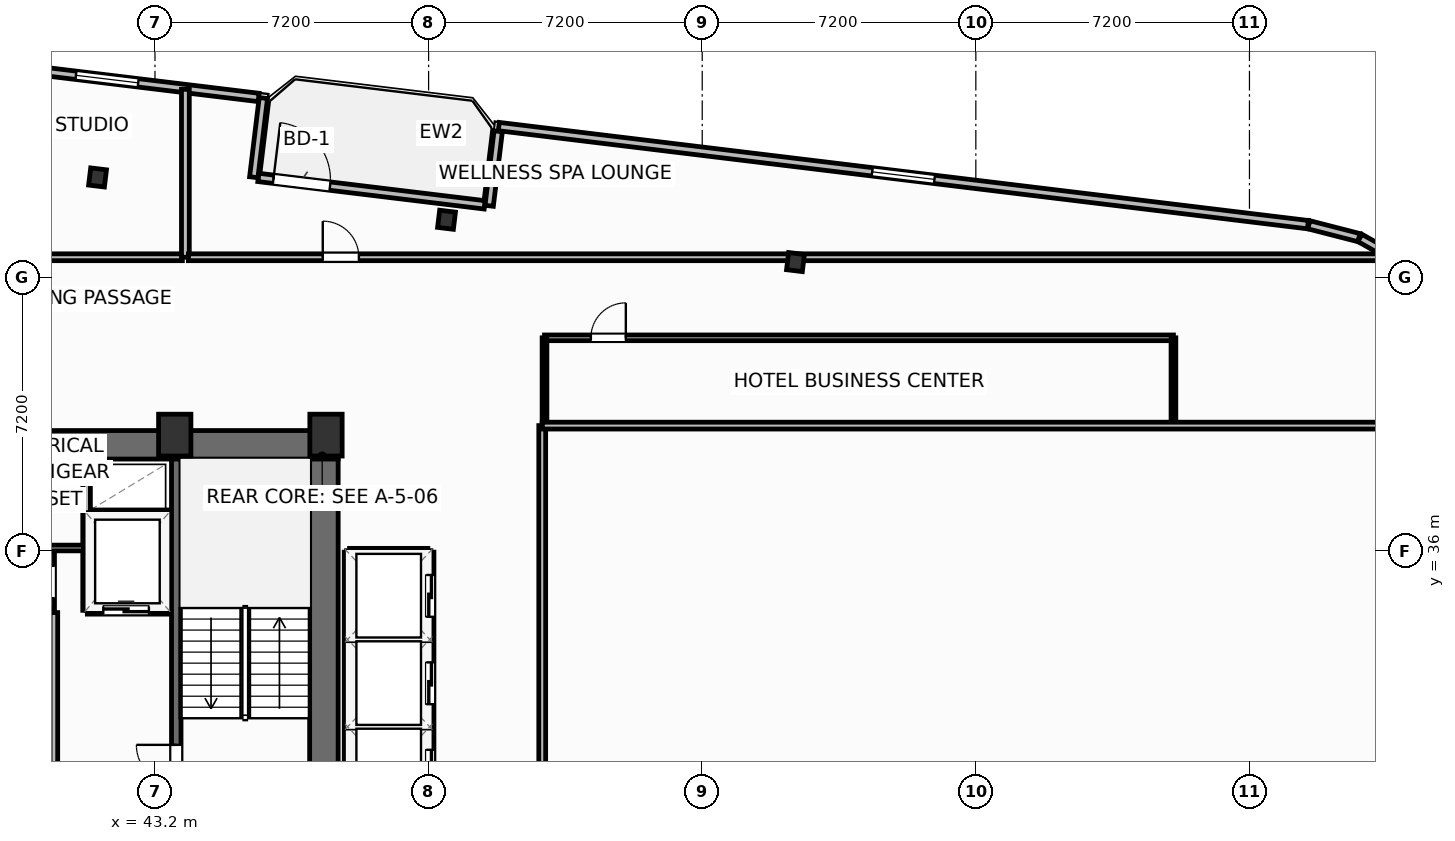
"""IFC4 building model, lengths in metres.
Left out: names, types, materials, properties, quantities, classifications, styles, units other than length and angle.
Written with IfcOpenShell. Run it as: python <this file> out.ifc"""

import sys

from ifc_helpers import new_model, si_unit, direction, frame, frame_2d, origin, origin_2d, place, context, subcontext, project, spatial, rectangle, i_section, extrude, element, fill, save


model = new_model("IFC4")
c1 = context("Model", 3, precision=1e-05, world=origin(), true_north=direction((0.0, 1.0)))
c2 = subcontext(c1, "Body", "Model", "MODEL_VIEW")
j1 = project(units=[si_unit("LENGTHUNIT", "METRE"), si_unit("PLANEANGLEUNIT", "RADIAN")], contexts=[c1])
p1 = place(None, origin())
s1 = spatial("IfcSite", under=j1, at=p1, CompositionType="ELEMENT")
p2 = place(p1, origin())
s2 = spatial("IfcBuilding", under=s1, at=p2, CompositionType="ELEMENT")
p3 = place(p2, frame((0.0, 0.0, 155.0)))
s3 = spatial("IfcBuildingStorey", under=s2, at=p3, CompositionType="ELEMENT", Elevation=155.0)
for number, where, z_axis, x_axis in (
    (1, (43.72, 39.05, 0.0), (0.0, 0.0, 1.0), (1.0, 0.0, 0.0)),
    (2, (47.7, 39.05, 0.0), (0.0, 0.0, 1.0), (1.0, 0.0, 0.0)),
):
    element("IfcColumn", number, at=place(p3, frame(where, z_axis=z_axis, x_axis=x_axis)), inside=s3, PredefinedType="COLUMN", context=c2, shape_type="SweptSolid", body=[
        extrude(rectangle(XDim=0.85, YDim=1.1, at=origin_2d()), origin(), (0.0, 0.0, 1.0), 3.7),
    ])
p4 = place(p3, frame((30.38, 38.795, 0.0), z_axis=(0.0, 0.0, 1.0), x_axis=(1.0, 0.0, 0.0)))
e3 = element("IfcWall", 3, at=p4, inside=s3, PredefinedType="SHEAR", context=c2, shape_type="SweptSolid", body=[
    extrude(rectangle(XDim=17.64, YDim=0.75, at=frame_2d((8.82, 0.0))), origin(), (0.0, 0.0, 1.0), 3.45),
])
p5 = place(p3, frame((47.645, 29.2, 0.0), z_axis=(0.0, 0.0, 1.0), x_axis=(0.0, 1.0, 0.0)))
e4 = element("IfcWall", 4, at=p5, inside=s3, PredefinedType="SHEAR", context=c2, shape_type="SweptSolid", body=[
    extrude(rectangle(XDim=9.22, YDim=0.75, at=frame_2d((4.61, 0.0))), origin(), (0.0, 0.0, 1.0), 3.45),
])
p6 = place(p3, frame((43.76, 29.2, 0.0), z_axis=(0.0, 0.0, 1.0), x_axis=(0.0, 1.0, 0.0)))
e5 = element("IfcWall", 5, at=p6, inside=s3, PredefinedType="SHEAR", context=c2, shape_type="SweptSolid", body=[
    extrude(rectangle(XDim=9.22, YDim=0.25, at=frame_2d((4.61, 0.0))), origin(), (0.0, 0.0, 1.0), 3.45),
])
p7 = place(p6, frame((0.65, 0.0, 0.0)))
e6 = element("IfcOpeningElement", 6, at=p7, cuts=e5, PredefinedType="OPENING", context=c2, shape_type="SweptSolid", body=[
    extrude(rectangle(XDim=1.05, YDim=2.15, at=frame_2d((0.525, 1.075))), frame((0.0, 0.135, 0.0), z_axis=(0.0, -1.0, 0.0), x_axis=(1.0, 0.0, 0.0)), (0.0, 0.0, 1.0), 0.27),
])
for number, where, z_axis, x_axis in (
    (7, (60.054, 43.603, 0.0), (0.0, 0.0, 1.0), (0.993, -0.12, 0.0)),
    (8, (50.872, 44.717, 0.0), (0.0, 0.0, 1.0), (0.993, -0.12, 0.0)),
    (9, (41.689, 45.83, 0.0), (0.0, 0.0, 1.0), (0.993, -0.12, 0.0)),
):
    element("IfcColumn", number, at=place(p3, frame(where, z_axis=z_axis, x_axis=x_axis)), inside=s3, PredefinedType="COLUMN", context=c2, shape_type="SweptSolid", body=[
        extrude(i_section(OverallWidth=0.418, OverallDepth=0.455, WebThickness=0.042, FlangeThickness=0.068, FilletRadius=0.025, at=origin_2d()), origin(), (0.0, 0.0, 1.0), 3.7),
    ])
p8 = place(p3, frame((45.92, 45.831, 0.0), z_axis=(0.0, 0.0, 1.0), x_axis=(0.992729951822, -0.120362962556, 0.0)))
e10 = element("IfcWall", 10, at=p8, inside=s3, PredefinedType="SOLIDWALL", context=c2, shape_type="SweptSolid", body=[
    extrude(rectangle(XDim=6.0, YDim=0.22, at=frame_2d((3.0, 0.0))), origin(), (0.0, 0.0, 1.0), 2.73),
])
p9 = place(p8, frame((0.4, 0.0, 0.0)))
e11 = element("IfcOpeningElement", 11, at=p9, cuts=e10, PredefinedType="OPENING", context=c2, shape_type="SweptSolid", body=[
    extrude(rectangle(XDim=1.5, YDim=2.25, at=frame_2d((0.75, 1.125))), frame((0.0, 0.12, 0.0), z_axis=(0.0, -1.0, 0.0), x_axis=(1.0, 0.0, 0.0)), (0.0, 0.0, 1.0), 0.24),
])
p10 = place(p3, frame((76.084, 43.575, 0.0), z_axis=(0.0, 0.0, 1.0), x_axis=(-0.871093268227, 0.491117621399, 0.0)))
e12 = element("IfcWall", 12, at=p10, inside=s3, PredefinedType="SOLIDWALL", context=c2, shape_type="SweptSolid", body=[
    extrude(rectangle(XDim=1.353, YDim=0.22, at=frame_2d((0.677, 0.0))), origin(), (0.0, 0.0, 1.0), 2.73),
])
p11 = place(p3, frame((74.881, 44.246, 0.0), z_axis=(0.0, 0.0, 1.0), x_axis=(-0.968549775063, 0.248819881091, 0.0)))
e13 = element("IfcWall", 13, at=p11, inside=s3, PredefinedType="SOLIDWALL", context=c2, shape_type="SweptSolid", body=[
    extrude(rectangle(XDim=1.361, YDim=0.22, at=frame_2d((0.68, 0.0))), origin(), (0.0, 0.0, 1.0), 2.73),
])
p12 = place(p3, frame((73.538, 44.588, 0.0), z_axis=(0.0, 0.0, 1.0), x_axis=(-0.992733493583, 0.120333747213, 0.0)))
e14 = element("IfcWall", 14, at=p12, inside=s3, PredefinedType="SOLIDWALL", context=c2, shape_type="SweptSolid", body=[
    extrude(rectangle(XDim=21.447, YDim=0.22, at=frame_2d((10.724, 0.0))), origin(), (0.0, 0.0, 1.0), 2.73),
])
p13 = place(p12, frame((9.899, 0.0, 0.8)))
e15 = element("IfcOpeningElement", 15, at=p13, cuts=e14, PredefinedType="OPENING", context=c2, shape_type="SweptSolid", body=[
    extrude(rectangle(XDim=1.65, YDim=1.65, at=frame_2d((0.825, 0.825))), frame((0.0, 0.12, 0.0), z_axis=(0.0, -1.0, 0.0), x_axis=(1.0, 0.0, 0.0)), (0.0, 0.0, 1.0), 0.24),
])
p14 = place(p3, frame((52.231, 47.045, 0.0), z_axis=(0.0, 0.0, 1.0), x_axis=(-0.120275992932, -0.992740492538, 0.0)))
e16 = element("IfcWall", 16, at=p14, inside=s3, PredefinedType="SOLIDWALL", context=c2, shape_type="SweptSolid", body=[
    extrude(rectangle(XDim=1.975, YDim=0.22, at=frame_2d((0.988, 0.0))), origin(), (0.0, 0.0, 1.0), 2.73),
])
p15 = place(p3, frame((45.799, 45.835, 0.0), z_axis=(0.0, 0.0, 1.0), x_axis=(0.120314009587, 0.992735885871, 0.0)))
e17 = element("IfcWall", 17, at=p15, inside=s3, PredefinedType="SOLIDWALL", context=c2, shape_type="SweptSolid", body=[
    extrude(rectangle(XDim=2.1, YDim=0.22, at=frame_2d((1.05, 0.0))), origin(), (0.0, 0.0, 1.0), 2.73),
])
p16 = place(p3, frame((45.928, 47.935, 0.0), z_axis=(0.0, 0.0, 1.0), x_axis=(-0.992730591876, 0.120357683402, 0.0)))
e18 = element("IfcWall", 18, at=p16, inside=s3, PredefinedType="SOLIDWALL", context=c2, shape_type="SweptSolid", body=[
    extrude(rectangle(XDim=8.035, YDim=0.22, at=frame_2d((4.017, 0.0))), origin(), (0.0, 0.0, 1.0), 2.73),
])
p17 = place(p16, frame((3.192, 0.0, 0.8)))
e19 = element("IfcOpeningElement", 19, at=p17, cuts=e18, PredefinedType="OPENING", context=c2, shape_type="SweptSolid", body=[
    extrude(rectangle(XDim=1.65, YDim=1.65, at=frame_2d((0.825, 0.825))), frame((0.0, 0.12, 0.0), z_axis=(0.0, -1.0, 0.0), x_axis=(1.0, 0.0, 0.0)), (0.0, 0.0, 1.0), 0.24),
])
p18 = place(p3, frame((53.45, 41.61, 0.0), z_axis=(0.0, 0.0, 1.0), x_axis=(1.0, 0.0, 0.0)))
e20 = element("IfcWall", 20, at=p18, inside=s3, PredefinedType="PARTITIONING", context=c2, shape_type="SweptSolid", body=[
    extrude(rectangle(XDim=16.55, YDim=0.15, at=frame_2d((8.275, 0.0))), origin(), (0.0, 0.0, 1.0), 2.972),
])
p19 = place(p18, frame((1.22, 0.0, 0.0)))
e21 = element("IfcOpeningElement", 21, at=p19, cuts=e20, PredefinedType="OPENING", context=c2, shape_type="SweptSolid", body=[
    extrude(rectangle(XDim=0.92, YDim=2.05, at=frame_2d((0.46, 1.025))), frame((0.0, 0.085, 0.0), z_axis=(0.0, -1.0, 0.0), x_axis=(1.0, 0.0, 0.0)), (0.0, 0.0, 1.0), 0.17),
])
for number, where, z_axis, x_axis in (
    (22, (53.45, 39.3, 0.0), (0.0, 0.0, 1.0), (0.0, 1.0, 0.0)),
    (23, (70.0, 39.3, 0.0), (0.0, 0.0, 1.0), (0.0, 1.0, 0.0)),
):
    element("IfcWall", number, at=place(p3, frame(where, z_axis=z_axis, x_axis=x_axis)), inside=s3, PredefinedType="PARTITIONING", context=c2, shape_type="SweptSolid", body=[
        extrude(rectangle(XDim=2.31, YDim=0.125, at=frame_2d((1.155, 0.0))), origin(), (0.0, 0.0, 1.0), 3.45),
    ])
p20 = place(p3, frame((29.08, 43.73, 0.0), z_axis=(0.0, 0.0, 1.0), x_axis=(1.0, 0.0, 0.0)))
e24 = element("IfcWall", 24, at=p20, inside=s3, PredefinedType="PARTITIONING", context=c2, shape_type="SweptSolid", body=[
    extrude(rectangle(XDim=14.84, YDim=0.18, at=frame_2d((7.42, 0.0))), origin(), (0.0, 0.0, 1.0), 2.972),
])
p21 = place(p20, frame((6.945, 0.0, 0.0)))
e25 = element("IfcOpeningElement", 25, at=p21, cuts=e24, PredefinedType="OPENING", context=c2, shape_type="SweptSolid", body=[
    extrude(rectangle(XDim=0.95, YDim=2.05, at=frame_2d((0.475, 1.025))), frame((0.0, 0.1, 0.0), z_axis=(0.0, -1.0, 0.0), x_axis=(1.0, 0.0, 0.0)), (0.0, 0.0, 1.0), 0.2),
])
p22 = place(p3, frame((44.0, 43.73, 0.0), z_axis=(0.0, 0.0, 1.0), x_axis=(0.0, 1.0, 0.0)))
e26 = element("IfcWall", 26, at=p22, inside=s3, PredefinedType="PARTITIONING", context=c2, shape_type="SweptSolid", body=[
    extrude(rectangle(XDim=4.418, YDim=0.205, at=frame_2d((2.209, 0.0))), origin(), (0.0, 0.0, 1.0), 3.45),
])
p23 = place(p3, frame((44.08, 43.73, 0.0), z_axis=(0.0, 0.0, 1.0), x_axis=(1.0, 0.0, 0.0)))
e27 = element("IfcWall", 27, at=p23, inside=s3, PredefinedType="PARTITIONING", context=c2, shape_type="SweptSolid", body=[
    extrude(rectangle(XDim=31.689, YDim=0.18, at=frame_2d((15.845, 0.0))), origin(), (0.0, 0.0, 1.0), 2.824),
])
p24 = place(p23, frame((3.535, 0.0, 0.0)))
e28 = element("IfcOpeningElement", 28, at=p24, cuts=e27, PredefinedType="OPENING", context=c2, shape_type="SweptSolid", body=[
    extrude(rectangle(XDim=0.95, YDim=2.05, at=frame_2d((0.475, 1.025))), frame((0.0, 0.1, 0.0), z_axis=(0.0, -1.0, 0.0), x_axis=(1.0, 0.0, 0.0)), (0.0, 0.0, 1.0), 0.2),
])
p25 = place(p3, frame((53.39, 19.24, 0.0), z_axis=(0.0, 0.0, 1.0), x_axis=(0.0, 1.0, 0.0)))
e29 = element("IfcWall", 29, at=p25, inside=s3, PredefinedType="PARTITIONING", context=c2, shape_type="SweptSolid", body=[
    extrude(rectangle(XDim=20.06, YDim=0.18, at=frame_2d((10.03, 0.0))), origin(), (0.0, 0.0, 1.0), 3.45),
])
p26 = place(p25, frame((7.7, 0.0, 0.0)))
e30 = element("IfcOpeningElement", 30, at=p26, cuts=e29, PredefinedType="OPENING", context=c2, shape_type="SweptSolid", body=[
    extrude(rectangle(XDim=0.95, YDim=2.05, at=frame_2d((0.475, 1.025))), frame((0.0, 0.1, 0.0), z_axis=(0.0, -1.0, 0.0), x_axis=(1.0, 0.0, 0.0)), (0.0, 0.0, 1.0), 0.2),
])
p27 = place(p3, frame((53.39, 39.3, 0.0), z_axis=(0.0, 0.0, 1.0), x_axis=(1.0, 0.0, 0.0)))
e31 = element("IfcWall", 31, at=p27, inside=s3, PredefinedType="PARTITIONING", context=c2, shape_type="SweptSolid", body=[
    extrude(rectangle(XDim=24.74, YDim=0.18, at=frame_2d((12.37, 0.0))), origin(), (0.0, 0.0, 1.0), 3.45),
])
p28 = place(p3, frame((40.54, 29.2, 0.0), z_axis=(0.0, 0.0, 1.0), x_axis=(0.0, 1.0, 0.0)))
e32 = element("IfcWall", 32, at=p28, inside=s3, PredefinedType="PARTITIONING", context=c2, shape_type="SweptSolid", body=[
    extrude(rectangle(XDim=5.18, YDim=0.2, at=frame_2d((2.59, 0.0))), origin(), (0.0, 0.0, 1.0), 3.45),
])
p29 = place(p3, frame((41.42, 34.44, 0.0), z_axis=(0.0, 0.0, 1.0), x_axis=(1.0, 0.0, 0.0)))
e33 = element("IfcWall", 33, at=p29, inside=s3, PredefinedType="PARTITIONING", context=c2, shape_type="SweptSolid", body=[
    extrude(rectangle(XDim=2.18, YDim=0.2, at=frame_2d((1.09, 0.0))), origin(), (0.0, 0.0, 1.0), 3.45),
])
p30 = place(p29, frame((0.42, 0.0, 0.0)))
e34 = element("IfcOpeningElement", 34, at=p30, cuts=e33, PredefinedType="OPENING", context=c2, shape_type="SweptSolid", body=[
    extrude(rectangle(XDim=1.2, YDim=2.2, at=frame_2d((0.6, 1.1))), frame((0.0, 0.11, 0.0), z_axis=(0.0, -1.0, 0.0), x_axis=(1.0, 0.0, 0.0)), (0.0, 0.0, 1.0), 0.22),
])
p31 = place(p3, frame((41.42, 36.98, 0.0), z_axis=(0.0, 0.0, 1.0), x_axis=(1.0, 0.0, 0.0)))
e35 = element("IfcWall", 35, at=p31, inside=s3, PredefinedType="PARTITIONING", context=c2, shape_type="SweptSolid", body=[
    extrude(rectangle(XDim=2.18, YDim=0.2, at=frame_2d((1.09, 0.0))), origin(), (0.0, 0.0, 1.0), 3.45),
])
p32 = place(p3, frame((41.4, 34.44, 0.0), z_axis=(0.0, 0.0, 1.0), x_axis=(0.0, 1.0, 0.0)))
e36 = element("IfcWall", 36, at=p32, inside=s3, PredefinedType="PARTITIONING", context=c2, shape_type="SweptSolid", body=[
    extrude(rectangle(XDim=3.9, YDim=0.2, at=frame_2d((1.95, 0.0))), origin(), (0.0, 0.0, 1.0), 3.45),
])
p33 = place(p3, frame((39.3, 36.08, 0.0), z_axis=(0.0, 0.0, 1.0), x_axis=(1.0, 0.0, 0.0)))
e37 = element("IfcWall", 37, at=p33, inside=s3, PredefinedType="PARTITIONING", context=c2, shape_type="SweptSolid", body=[
    extrude(rectangle(XDim=2.02, YDim=0.15, at=frame_2d((1.01, 0.0))), origin(), (0.0, 0.0, 1.0), 3.45),
])
p34 = place(p33, frame((0.18, 0.0, 0.0)))
e38 = element("IfcOpeningElement", 38, at=p34, cuts=e37, PredefinedType="OPENING", context=c2, shape_type="SweptSolid", body=[
    extrude(rectangle(XDim=0.85, YDim=2.05, at=frame_2d((0.425, 1.025))), frame((0.0, 0.085, 0.0), z_axis=(0.0, -1.0, 0.0), x_axis=(1.0, 0.0, 0.0)), (0.0, 0.0, 1.0), 0.17),
])
p35 = place(p3, frame((40.48, 34.44, 0.0), z_axis=(0.0, 0.0, 1.0), x_axis=(0.0, 1.0, 0.0)))
e39 = element("IfcWall", 39, at=p35, inside=s3, PredefinedType="PARTITIONING", context=c2, shape_type="SweptSolid", body=[
    extrude(rectangle(XDim=1.52, YDim=0.15, at=frame_2d((0.76, 0.0))), origin(), (0.0, 0.0, 1.0), 3.45),
])
p36 = place(p35, frame((0.32, 0.0, 0.0)))
e40 = element("IfcOpeningElement", 40, at=p36, cuts=e39, PredefinedType="OPENING", context=c2, shape_type="SweptSolid", body=[
    extrude(rectangle(XDim=0.85, YDim=2.05, at=frame_2d((0.425, 1.025))), frame((0.0, 0.085, 0.0), z_axis=(0.0, -1.0, 0.0), x_axis=(1.0, 0.0, 0.0)), (0.0, 0.0, 1.0), 0.17),
])
for number, where, z_axis, x_axis in (
    (41, (48.32, 31.375, 0.0), (0.0, 0.0, 1.0), (1.0, 0.0, 0.0)),
    (42, (48.32, 33.675, 0.0), (0.0, 0.0, 1.0), (1.0, 0.0, 0.0)),
    (43, (48.32, 35.97, 0.0), (0.0, 0.0, 1.0), (1.0, 0.0, 0.0)),
):
    element("IfcWall", number, at=place(p3, frame(where, z_axis=z_axis, x_axis=x_axis)), inside=s3, PredefinedType="PARTITIONING", context=c2, shape_type="SweptSolid", body=[
        extrude(rectangle(XDim=2.06, YDim=0.2, at=frame_2d((1.03, 0.0))), origin(), (0.0, 0.0, 1.0), 3.45),
    ])
p37 = place(p3, frame((48.28, 29.08, 0.0), z_axis=(0.0, 0.0, 1.0), x_axis=(0.0, 1.0, 0.0)))
e44 = element("IfcWall", 44, at=p37, inside=s3, PredefinedType="PARTITIONING", context=c2, shape_type="SweptSolid", body=[
    extrude(rectangle(XDim=6.89, YDim=0.2, at=frame_2d((3.445, 0.0))), origin(), (0.0, 0.0, 1.0), 3.45),
])
p38 = place(p3, frame((50.44, 29.08, 0.0), z_axis=(0.0, 0.0, 1.0), x_axis=(0.0, 1.0, 0.0)))
e45 = element("IfcWall", 45, at=p38, inside=s3, PredefinedType="PARTITIONING", context=c2, shape_type="SweptSolid", body=[
    extrude(rectangle(XDim=6.89, YDim=0.2, at=frame_2d((3.445, 0.0))), origin(), (0.0, 0.0, 1.0), 3.45),
])
p39 = place(p38, frame((0.59, 0.0, 0.0)))
e46 = element("IfcOpeningElement", 46, at=p39, cuts=e45, PredefinedType="OPENING", context=c2, shape_type="SweptSolid", body=[
    extrude(rectangle(XDim=1.1, YDim=2.15, at=frame_2d((0.55, 1.075))), frame((0.0, 0.11, 0.0), z_axis=(0.0, -1.0, 0.0), x_axis=(1.0, 0.0, 0.0)), (0.0, 0.0, 1.0), 0.22),
])
p40 = place(p38, frame((2.89, 0.0, 0.0)))
e47 = element("IfcOpeningElement", 47, at=p40, cuts=e45, PredefinedType="OPENING", context=c2, shape_type="SweptSolid", body=[
    extrude(rectangle(XDim=1.1, YDim=2.15, at=frame_2d((0.55, 1.075))), frame((0.0, 0.11, 0.0), z_axis=(0.0, -1.0, 0.0), x_axis=(1.0, 0.0, 0.0)), (0.0, 0.0, 1.0), 0.22),
])
p41 = place(p38, frame((5.19, 0.0, 0.0)))
e48 = element("IfcOpeningElement", 48, at=p41, cuts=e45, PredefinedType="OPENING", context=c2, shape_type="SweptSolid", body=[
    extrude(rectangle(XDim=1.1, YDim=2.15, at=frame_2d((0.55, 1.075))), frame((0.0, 0.11, 0.0), z_axis=(0.0, -1.0, 0.0), x_axis=(1.0, 0.0, 0.0)), (0.0, 0.0, 1.0), 0.22),
])
p42 = place(p9, origin())
e49 = element("IfcDoor", 49, at=p42, inside=s3, OperationType="SINGLE_SWING_LEFT", PredefinedType="DOOR", context=c2, shape_type="SweptSolid", body=[
    extrude(rectangle(XDim=1.5, YDim=2.25, at=frame_2d((0.75, 1.125))), frame((0.0, 0.025, 0.0), z_axis=(0.0, -1.0, 0.0), x_axis=(1.0, 0.0, 0.0)), (0.0, 0.0, 1.0), 0.05),
])
fill(e11, e49)
p43 = place(p13, origin())
e50 = element("IfcWindow", 50, at=p43, inside=s3, PartitioningType="SINGLE_PANEL", PredefinedType="WINDOW", context=c2, shape_type="SweptSolid", body=[
    extrude(rectangle(XDim=1.65, YDim=1.65, at=frame_2d((0.825, 0.825))), frame((0.0, 0.03, 0.0), z_axis=(0.0, -1.0, 0.0), x_axis=(1.0, 0.0, 0.0)), (0.0, 0.0, 1.0), 0.06),
])
fill(e15, e50)
p44 = place(p17, origin())
e51 = element("IfcWindow", 51, at=p44, inside=s3, PartitioningType="SINGLE_PANEL", PredefinedType="WINDOW", context=c2, shape_type="SweptSolid", body=[
    extrude(rectangle(XDim=1.65, YDim=1.65, at=frame_2d((0.825, 0.825))), frame((0.0, 0.03, 0.0), z_axis=(0.0, -1.0, 0.0), x_axis=(1.0, 0.0, 0.0)), (0.0, 0.0, 1.0), 0.06),
])
fill(e19, e51)
p45 = place(p19, origin())
e52 = element("IfcDoor", 52, at=p45, inside=s3, OperationType="SINGLE_SWING_RIGHT", PredefinedType="DOOR", context=c2, shape_type="SweptSolid", body=[
    extrude(rectangle(XDim=0.92, YDim=2.05, at=frame_2d((0.46, 1.025))), frame((0.0, 0.025, 0.0), z_axis=(0.0, -1.0, 0.0), x_axis=(1.0, 0.0, 0.0)), (0.0, 0.0, 1.0), 0.05),
])
fill(e21, e52)
p46 = place(p24, origin())
e53 = element("IfcDoor", 53, at=p46, inside=s3, OperationType="SINGLE_SWING_LEFT", PredefinedType="DOOR", context=c2, shape_type="SweptSolid", body=[
    extrude(rectangle(XDim=0.95, YDim=2.05, at=frame_2d((0.475, 1.025))), frame((0.0, 0.025, 0.0), z_axis=(0.0, -1.0, 0.0), x_axis=(1.0, 0.0, 0.0)), (0.0, 0.0, 1.0), 0.05),
])
fill(e28, e53)
p47 = place(p7, origin())
e54 = element("IfcDoor", 54, at=p47, inside=s3, OperationType="SINGLE_SWING_RIGHT", PredefinedType="DOOR", context=c2, shape_type="SweptSolid", body=[
    extrude(rectangle(XDim=1.05, YDim=2.15, at=frame_2d((0.525, 1.075))), frame((0.0, 0.025, 0.0), z_axis=(0.0, -1.0, 0.0), x_axis=(1.0, 0.0, 0.0)), (0.0, 0.0, 1.0), 0.05),
])
fill(e6, e54)
p48 = place(p30, origin())
e55 = element("IfcDoor", 55, at=p48, inside=s3, OperationType="SLIDING_TO_LEFT", PredefinedType="DOOR", context=c2, shape_type="SweptSolid", body=[
    extrude(rectangle(XDim=1.2, YDim=2.2, at=frame_2d((0.6, 1.1))), frame((0.0, 0.025, 0.0), z_axis=(0.0, -1.0, 0.0), x_axis=(1.0, 0.0, 0.0)), (0.0, 0.0, 1.0), 0.05),
])
fill(e34, e55)
p49 = place(p36, origin())
e56 = element("IfcDoor", 56, at=p49, inside=s3, OperationType="SINGLE_SWING_LEFT", PredefinedType="DOOR", context=c2, shape_type="SweptSolid", body=[
    extrude(rectangle(XDim=0.85, YDim=2.05, at=frame_2d((0.425, 1.025))), frame((0.0, 0.025, 0.0), z_axis=(0.0, -1.0, 0.0), x_axis=(1.0, 0.0, 0.0)), (0.0, 0.0, 1.0), 0.05),
])
fill(e40, e56)
p50 = place(p39, origin())
e57 = element("IfcDoor", 57, at=p50, inside=s3, OperationType="SLIDING_TO_LEFT", PredefinedType="DOOR", context=c2, shape_type="SweptSolid", body=[
    extrude(rectangle(XDim=1.1, YDim=2.15, at=frame_2d((0.55, 1.075))), frame((0.0, 0.025, 0.0), z_axis=(0.0, -1.0, 0.0), x_axis=(1.0, 0.0, 0.0)), (0.0, 0.0, 1.0), 0.05),
])
fill(e46, e57)
p51 = place(p40, origin())
e58 = element("IfcDoor", 58, at=p51, inside=s3, OperationType="SLIDING_TO_LEFT", PredefinedType="DOOR", context=c2, shape_type="SweptSolid", body=[
    extrude(rectangle(XDim=1.1, YDim=2.15, at=frame_2d((0.55, 1.075))), frame((0.0, 0.025, 0.0), z_axis=(0.0, -1.0, 0.0), x_axis=(1.0, 0.0, 0.0)), (0.0, 0.0, 1.0), 0.05),
])
fill(e47, e58)
p52 = place(p41, origin())
e59 = element("IfcDoor", 59, at=p52, inside=s3, OperationType="SLIDING_TO_LEFT", PredefinedType="DOOR", context=c2, shape_type="SweptSolid", body=[
    extrude(rectangle(XDim=1.1, YDim=2.15, at=frame_2d((0.55, 1.075))), frame((0.0, 0.025, 0.0), z_axis=(0.0, -1.0, 0.0), x_axis=(1.0, 0.0, 0.0)), (0.0, 0.0, 1.0), 0.05),
])
fill(e48, e59)
save(model, sys.argv[1])
